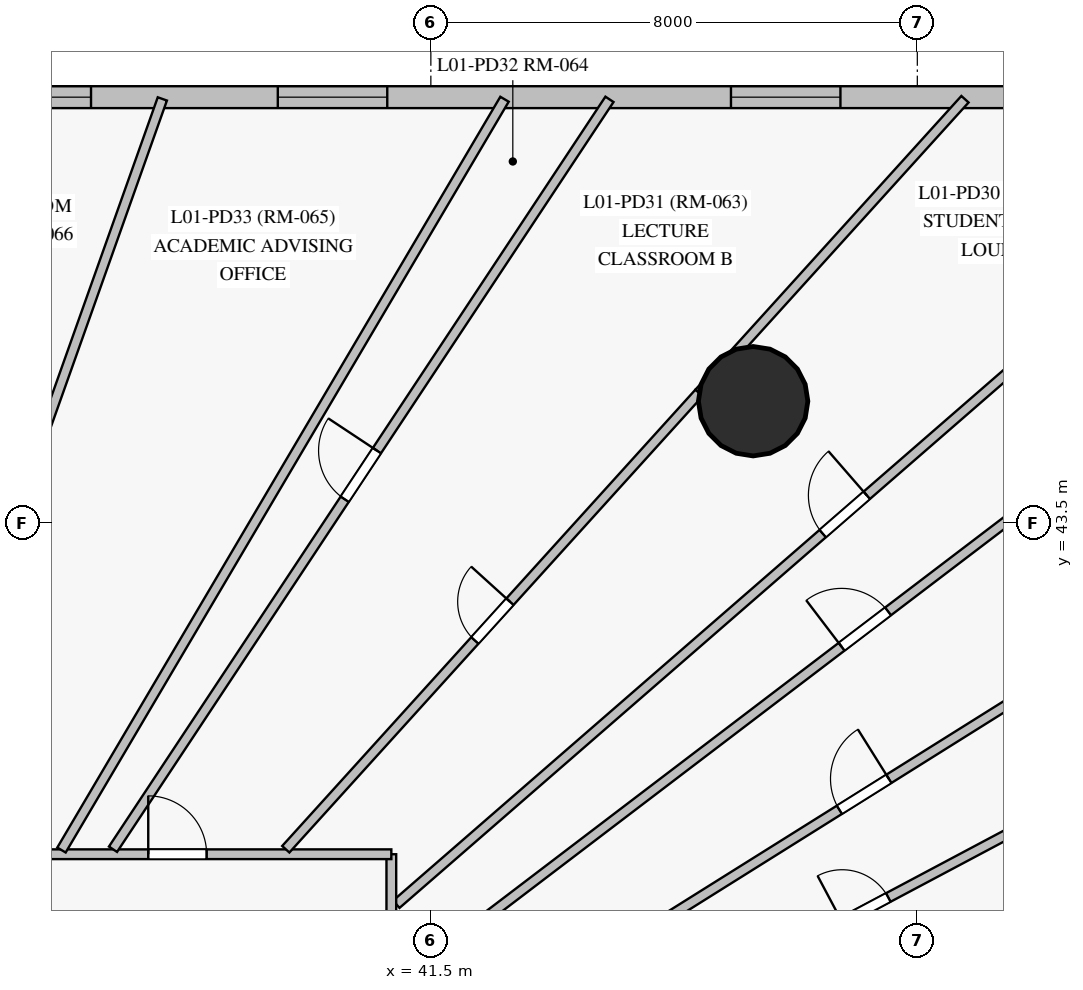
"""IFC4 building model, lengths in metres.
Left out: names, types, materials, properties, quantities, classifications, styles, units other than length and angle.
Written with IfcOpenShell. Run it as: python <this file> out.ifc"""

import sys

from ifc_helpers import new_model, si_unit, direction, frame, frame_2d, origin, origin_with_axes, origin_2d, place, context, subcontext, project, spatial, rectangle, circle, extrude, source, transform, mapped, element, fill, save


model = new_model("IFC4")
c1 = context("Model", 3, precision=1e-05, world=origin(), true_north=direction((0.0, 1.0)))
c2 = subcontext(c1, "Body", "Model", "MODEL_VIEW")
j1 = project(units=[si_unit("LENGTHUNIT", "METRE"), si_unit("PLANEANGLEUNIT", "RADIAN")], contexts=[c1])
p1 = place(None, origin())
s1 = spatial("IfcSite", under=j1, at=p1, CompositionType="ELEMENT")
p2 = place(p1, origin())
s2 = spatial("IfcBuilding", under=s1, at=p2, CompositionType="ELEMENT")
p3 = place(p2, frame((0.0, 0.0, 4.5)))
s3 = spatial("IfcBuildingStorey", under=s2, at=p3, CompositionType="ELEMENT", Elevation=4.5)
m1 = source(origin_with_axes(), c2, "Body", "SweptSolid", [
    extrude(circle(Radius=0.9, at=origin_2d()), origin(), (0.0, 0.0, 1.0), 4.5),
])
p4 = place(p3, frame((46.8, 45.5, 0.0), z_axis=(0.0, 0.0, 1.0), x_axis=(1.0, 0.0, 0.0)))
e1 = element("IfcColumn", 1, at=p4, inside=s3, PredefinedType="COLUMN", context=c2, shape_type="MappedRepresentation", body=[
    mapped(m1, transform((0.0, 0.0, 0.0), scale=1.0)),
])
p5 = place(p3, frame((55.3, 50.5, 0.0), z_axis=(0.0, 0.0, 1.0), x_axis=(-1.0, 0.0, 0.0)))
e2 = element("IfcWall", 2, at=p5, inside=s3, PredefinedType="SOLIDWALL", context=c2, shape_type="SweptSolid", body=[
    extrude(rectangle(XDim=51.85, YDim=0.36, at=frame_2d((25.925, 0.0))), origin(), (0.0, 0.0, 1.0), 4.2),
])
p6 = place(p5, frame((1.739, 0.0, 0.85)))
e3 = element("IfcOpeningElement", 3, at=p6, cuts=e2, PredefinedType="OPENING", context=c2, shape_type="SweptSolid", body=[
    extrude(rectangle(XDim=1.8, YDim=2.2, at=frame_2d((0.9, 1.1))), frame((0.0, 0.19, 0.0), z_axis=(0.0, -1.0, 0.0), x_axis=(1.0, 0.0, 0.0)), (0.0, 0.0, 1.0), 0.38),
])
p7 = place(p5, frame((7.064, 0.0, 0.85)))
e4 = element("IfcOpeningElement", 4, at=p7, cuts=e2, PredefinedType="OPENING", context=c2, shape_type="SweptSolid", body=[
    extrude(rectangle(XDim=1.8, YDim=2.2, at=frame_2d((0.9, 1.1))), frame((0.0, 0.19, 0.0), z_axis=(0.0, -1.0, 0.0), x_axis=(1.0, 0.0, 0.0)), (0.0, 0.0, 1.0), 0.38),
])
p8 = place(p5, frame((14.517, 0.0, 0.85)))
e5 = element("IfcOpeningElement", 5, at=p8, cuts=e2, PredefinedType="OPENING", context=c2, shape_type="SweptSolid", body=[
    extrude(rectangle(XDim=1.8, YDim=2.2, at=frame_2d((0.9, 1.1))), frame((0.0, 0.19, 0.0), z_axis=(0.0, -1.0, 0.0), x_axis=(1.0, 0.0, 0.0)), (0.0, 0.0, 1.0), 0.38),
])
p9 = place(p5, frame((19.389, 0.0, 0.85)))
e6 = element("IfcOpeningElement", 6, at=p9, cuts=e2, PredefinedType="OPENING", context=c2, shape_type="SweptSolid", body=[
    extrude(rectangle(XDim=1.8, YDim=2.2, at=frame_2d((0.9, 1.1))), frame((0.0, 0.19, 0.0), z_axis=(0.0, -1.0, 0.0), x_axis=(1.0, 0.0, 0.0)), (0.0, 0.0, 1.0), 0.38),
])
p10 = place(p5, frame((23.507, 0.0, 0.85)))
e7 = element("IfcOpeningElement", 7, at=p10, cuts=e2, PredefinedType="OPENING", context=c2, shape_type="SweptSolid", body=[
    extrude(rectangle(XDim=1.8, YDim=2.2, at=frame_2d((0.9, 1.1))), frame((0.0, 0.19, 0.0), z_axis=(0.0, -1.0, 0.0), x_axis=(1.0, 0.0, 0.0)), (0.0, 0.0, 1.0), 0.38),
])
p11 = place(p5, frame((27.282, 0.0, 0.85)))
e8 = element("IfcOpeningElement", 8, at=p11, cuts=e2, PredefinedType="OPENING", context=c2, shape_type="SweptSolid", body=[
    extrude(rectangle(XDim=1.8, YDim=2.2, at=frame_2d((0.9, 1.1))), frame((0.0, 0.19, 0.0), z_axis=(0.0, -1.0, 0.0), x_axis=(1.0, 0.0, 0.0)), (0.0, 0.0, 1.0), 0.38),
])
p12 = place(p5, frame((31.1, 0.0, 0.85)))
e9 = element("IfcOpeningElement", 9, at=p12, cuts=e2, PredefinedType="OPENING", context=c2, shape_type="SweptSolid", body=[
    extrude(rectangle(XDim=1.8, YDim=2.2, at=frame_2d((0.9, 1.1))), frame((0.0, 0.19, 0.0), z_axis=(0.0, -1.0, 0.0), x_axis=(1.0, 0.0, 0.0)), (0.0, 0.0, 1.0), 0.38),
])
p13 = place(p5, frame((35.392, 0.0, 0.85)))
e10 = element("IfcOpeningElement", 10, at=p13, cuts=e2, PredefinedType="OPENING", context=c2, shape_type="SweptSolid", body=[
    extrude(rectangle(XDim=1.8, YDim=2.2, at=frame_2d((0.9, 1.1))), frame((0.0, 0.19, 0.0), z_axis=(0.0, -1.0, 0.0), x_axis=(1.0, 0.0, 0.0)), (0.0, 0.0, 1.0), 0.38),
])
p14 = place(p5, frame((42.797, 0.0, 0.85)))
e11 = element("IfcOpeningElement", 11, at=p14, cuts=e2, PredefinedType="OPENING", context=c2, shape_type="SweptSolid", body=[
    extrude(rectangle(XDim=1.8, YDim=2.2, at=frame_2d((0.9, 1.1))), frame((0.0, 0.19, 0.0), z_axis=(0.0, -1.0, 0.0), x_axis=(1.0, 0.0, 0.0)), (0.0, 0.0, 1.0), 0.38),
])
p15 = place(p5, frame((47.865, 0.0, 0.85)))
e12 = element("IfcOpeningElement", 12, at=p15, cuts=e2, PredefinedType="OPENING", context=c2, shape_type="SweptSolid", body=[
    extrude(rectangle(XDim=1.8, YDim=2.2, at=frame_2d((0.9, 1.1))), frame((0.0, 0.19, 0.0), z_axis=(0.0, -1.0, 0.0), x_axis=(1.0, 0.0, 0.0)), (0.0, 0.0, 1.0), 0.38),
])
p16 = place(p3, frame((40.932, 37.227, 0.0), z_axis=(0.0, 0.0, 1.0), x_axis=(0.754711343855, 0.656057000158, 0.0)))
e13 = element("IfcWall", 13, at=p16, inside=s3, PredefinedType="PARTITIONING", context=c2, shape_type="SweptSolid", body=[
    extrude(rectangle(XDim=19.568, YDim=0.16, at=frame_2d((9.784, 0.0))), origin(), (0.0, 0.0, 1.0), 4.2),
])
p17 = place(p16, frame((9.291, 0.0, 0.0)))
e14 = element("IfcOpeningElement", 14, at=p17, cuts=e13, PredefinedType="OPENING", context=c2, shape_type="SweptSolid", body=[
    extrude(rectangle(XDim=0.96, YDim=2.15, at=frame_2d((0.48, 1.075))), frame((0.0, 0.09, 0.0), z_axis=(0.0, -1.0, 0.0), x_axis=(1.0, 0.0, 0.0)), (0.0, 0.0, 1.0), 0.18),
])
p18 = place(p3, frame((40.932, 35.888, 0.0), z_axis=(0.0, 0.0, 1.0), x_axis=(0.795705622, 0.605683550311, 0.0)))
e15 = element("IfcWall", 15, at=p18, inside=s3, PredefinedType="PARTITIONING", context=c2, shape_type="SweptSolid", body=[
    extrude(rectangle(XDim=19.392, YDim=0.16, at=frame_2d((9.696, 0.0))), origin(), (0.0, 0.0, 1.0), 4.2),
])
p19 = place(p18, frame((9.203, 0.0, 0.0)))
e16 = element("IfcOpeningElement", 16, at=p19, cuts=e15, PredefinedType="OPENING", context=c2, shape_type="SweptSolid", body=[
    extrude(rectangle(XDim=0.96, YDim=2.15, at=frame_2d((0.48, 1.075))), frame((0.0, 0.09, 0.0), z_axis=(0.0, -1.0, 0.0), x_axis=(1.0, 0.0, 0.0)), (0.0, 0.0, 1.0), 0.18),
])
p20 = place(p3, frame((40.85, 38.05, 0.0), z_axis=(0.0, 0.0, 1.0), x_axis=(0.0, -1.0, 0.0)))
e17 = element("IfcWall", 17, at=p20, inside=s3, PredefinedType="PARTITIONING", context=c2, shape_type="SweptSolid", body=[
    extrude(rectangle(XDim=18.508, YDim=0.16, at=frame_2d((9.254, 0.0))), origin(), (0.0, 0.0, 1.0), 3.25),
])
p21 = place(p20, frame((13.28, 0.0, 0.0)))
e18 = element("IfcOpeningElement", 18, at=p21, cuts=e17, PredefinedType="OPENING", context=c2, shape_type="SweptSolid", body=[
    extrude(rectangle(XDim=0.96, YDim=2.15, at=frame_2d((0.48, 1.075))), frame((0.0, 0.09, 0.0), z_axis=(0.0, -1.0, 0.0), x_axis=(1.0, 0.0, 0.0)), (0.0, 0.0, 1.0), 0.18),
])
p22 = place(p20, frame((11.636, 0.0, 0.0)))
e19 = element("IfcOpeningElement", 19, at=p22, cuts=e17, PredefinedType="OPENING", context=c2, shape_type="SweptSolid", body=[
    extrude(rectangle(XDim=0.96, YDim=2.15, at=frame_2d((0.48, 1.075))), frame((0.0, 0.09, 0.0), z_axis=(0.0, -1.0, 0.0), x_axis=(1.0, 0.0, 0.0)), (0.0, 0.0, 1.0), 0.18),
])
p23 = place(p20, frame((8.835, 0.0, 0.0)))
e20 = element("IfcOpeningElement", 20, at=p23, cuts=e17, PredefinedType="OPENING", context=c2, shape_type="SweptSolid", body=[
    extrude(rectangle(XDim=0.96, YDim=2.15, at=frame_2d((0.48, 1.075))), frame((0.0, 0.09, 0.0), z_axis=(0.0, -1.0, 0.0), x_axis=(1.0, 0.0, 0.0)), (0.0, 0.0, 1.0), 0.18),
])
p24 = place(p20, frame((6.084, 0.0, 0.0)))
e21 = element("IfcOpeningElement", 21, at=p24, cuts=e17, PredefinedType="OPENING", context=c2, shape_type="SweptSolid", body=[
    extrude(rectangle(XDim=0.96, YDim=2.15, at=frame_2d((0.48, 1.075))), frame((0.0, 0.09, 0.0), z_axis=(0.0, -1.0, 0.0), x_axis=(1.0, 0.0, 0.0)), (0.0, 0.0, 1.0), 0.18),
])
p25 = place(p20, frame((7.2, 0.0, 0.0)))
e22 = element("IfcOpeningElement", 22, at=p25, cuts=e17, PredefinedType="OPENING", context=c2, shape_type="SweptSolid", body=[
    extrude(rectangle(XDim=0.96, YDim=2.15, at=frame_2d((0.48, 1.075))), frame((0.0, 0.09, 0.0), z_axis=(0.0, -1.0, 0.0), x_axis=(1.0, 0.0, 0.0)), (0.0, 0.0, 1.0), 0.18),
])
p26 = place(p20, frame((2.446, 0.0, 0.0)))
e23 = element("IfcOpeningElement", 23, at=p26, cuts=e17, PredefinedType="OPENING", context=c2, shape_type="SweptSolid", body=[
    extrude(rectangle(XDim=0.86, YDim=2.04, at=frame_2d((0.43, 1.02))), frame((0.0, 0.09, 0.0), z_axis=(0.0, -1.0, 0.0), x_axis=(1.0, 0.0, 0.0)), (0.0, 0.0, 1.0), 0.18),
])
p27 = place(p20, frame((1.037, 0.0, 0.0)))
e24 = element("IfcOpeningElement", 24, at=p27, cuts=e17, PredefinedType="OPENING", context=c2, shape_type="SweptSolid", body=[
    extrude(rectangle(XDim=0.86, YDim=2.04, at=frame_2d((0.43, 1.02))), frame((0.0, 0.09, 0.0), z_axis=(0.0, -1.0, 0.0), x_axis=(1.0, 0.0, 0.0)), (0.0, 0.0, 1.0), 0.18),
])
p28 = place(p3, frame((40.919, 34.208, 0.0), z_axis=(0.0, 0.0, 1.0), x_axis=(0.847469594602, 0.530843937731, 0.0)))
e25 = element("IfcWall", 25, at=p28, inside=s3, PredefinedType="PARTITIONING", context=c2, shape_type="SweptSolid", body=[
    extrude(rectangle(XDim=18.226, YDim=0.16, at=frame_2d((9.113, 0.0))), origin(), (0.0, 0.0, 1.0), 4.2),
])
p29 = place(p28, frame((8.613, 0.0, 0.0)))
e26 = element("IfcOpeningElement", 26, at=p29, cuts=e25, PredefinedType="OPENING", context=c2, shape_type="SweptSolid", body=[
    extrude(rectangle(XDim=0.96, YDim=2.15, at=frame_2d((0.48, 1.075))), frame((0.0, 0.09, 0.0), z_axis=(0.0, -1.0, 0.0), x_axis=(1.0, 0.0, 0.0)), (0.0, 0.0, 1.0), 0.18),
])
p30 = place(p3, frame((40.919, 33.032, 0.0), z_axis=(0.0, 0.0, 1.0), x_axis=(0.883043074969, 0.469291942984, 0.0)))
e27 = element("IfcWall", 27, at=p30, inside=s3, PredefinedType="PARTITIONING", context=c2, shape_type="SweptSolid", body=[
    extrude(rectangle(XDim=17.495, YDim=0.16, at=frame_2d((8.748, 0.0))), origin(), (0.0, 0.0, 1.0), 4.2),
])
p31 = place(p30, frame((8.317, 0.0, 0.0)))
e28 = element("IfcOpeningElement", 28, at=p31, cuts=e27, PredefinedType="OPENING", context=c2, shape_type="SweptSolid", body=[
    extrude(rectangle(XDim=0.86, YDim=2.04, at=frame_2d((0.43, 1.02))), frame((0.0, 0.09, 0.0), z_axis=(0.0, -1.0, 0.0), x_axis=(1.0, 0.0, 0.0)), (0.0, 0.0, 1.0), 0.18),
])
p32 = place(p3, frame((40.918, 32.192, 0.0), z_axis=(0.0, 0.0, 1.0), x_axis=(0.907224152949, 0.420647520265, 0.0)))
e29 = element("IfcWall", 29, at=p32, inside=s3, PredefinedType="PARTITIONING", context=c2, shape_type="SweptSolid", body=[
    extrude(rectangle(XDim=17.031, YDim=0.16, at=frame_2d((8.515, 0.0))), origin(), (0.0, 0.0, 1.0), 4.2),
])
p33 = place(p32, frame((8.015, 0.0, 0.0)))
e30 = element("IfcOpeningElement", 30, at=p33, cuts=e29, PredefinedType="OPENING", context=c2, shape_type="SweptSolid", body=[
    extrude(rectangle(XDim=0.96, YDim=2.15, at=frame_2d((0.48, 1.075))), frame((0.0, 0.09, 0.0), z_axis=(0.0, -1.0, 0.0), x_axis=(1.0, 0.0, 0.0)), (0.0, 0.0, 1.0), 0.18),
])
p34 = place(p3, frame((25.4, 38.05, 0.0), z_axis=(0.0, 0.0, 1.0), x_axis=(1.0, 0.0, 0.0)))
e31 = element("IfcWall", 31, at=p34, inside=s3, PredefinedType="PARTITIONING", context=c2, shape_type="SweptSolid", body=[
    extrude(rectangle(XDim=15.45, YDim=0.16, at=frame_2d((7.725, 0.0))), origin(), (0.0, 0.0, 1.0), 4.2),
])
p35 = place(p34, frame((11.452, 0.0, 0.0)))
e32 = element("IfcOpeningElement", 32, at=p35, cuts=e31, PredefinedType="OPENING", context=c2, shape_type="SweptSolid", body=[
    extrude(rectangle(XDim=0.96, YDim=2.15, at=frame_2d((0.48, 1.075))), frame((0.0, 0.09, 0.0), z_axis=(0.0, -1.0, 0.0), x_axis=(1.0, 0.0, 0.0)), (0.0, 0.0, 1.0), 0.18),
])
p36 = place(p34, frame((7.59, 0.0, 0.0)))
e33 = element("IfcOpeningElement", 33, at=p36, cuts=e31, PredefinedType="OPENING", context=c2, shape_type="SweptSolid", body=[
    extrude(rectangle(XDim=0.96, YDim=2.15, at=frame_2d((0.48, 1.075))), frame((0.0, 0.09, 0.0), z_axis=(0.0, -1.0, 0.0), x_axis=(1.0, 0.0, 0.0)), (0.0, 0.0, 1.0), 0.18),
])
p37 = place(p34, frame((5.573, 0.0, 0.0)))
e34 = element("IfcOpeningElement", 34, at=p37, cuts=e31, PredefinedType="OPENING", context=c2, shape_type="SweptSolid", body=[
    extrude(rectangle(XDim=0.96, YDim=2.15, at=frame_2d((0.48, 1.075))), frame((0.0, 0.09, 0.0), z_axis=(0.0, -1.0, 0.0), x_axis=(1.0, 0.0, 0.0)), (0.0, 0.0, 1.0), 0.18),
])
p38 = place(p34, frame((3.528, 0.0, 0.0)))
e35 = element("IfcOpeningElement", 35, at=p38, cuts=e31, PredefinedType="OPENING", context=c2, shape_type="SweptSolid", body=[
    extrude(rectangle(XDim=0.96, YDim=2.15, at=frame_2d((0.48, 1.075))), frame((0.0, 0.09, 0.0), z_axis=(0.0, -1.0, 0.0), x_axis=(1.0, 0.0, 0.0)), (0.0, 0.0, 1.0), 0.18),
])
p39 = place(p3, frame((36.273, 38.132, 0.0), z_axis=(0.0, 0.0, 1.0), x_axis=(0.552038412562, 0.833818679963, 0.0)))
e36 = element("IfcWall", 36, at=p39, inside=s3, PredefinedType="PARTITIONING", context=c2, shape_type="SweptSolid", body=[
    extrude(rectangle(XDim=14.79, YDim=0.16, at=frame_2d((7.395, 0.0))), origin(), (0.0, 0.0, 1.0), 4.2),
])
p40 = place(p39, frame((6.903, 0.0, 0.0)))
e37 = element("IfcOpeningElement", 37, at=p40, cuts=e36, PredefinedType="OPENING", context=c2, shape_type="SweptSolid", body=[
    extrude(rectangle(XDim=0.96, YDim=2.15, at=frame_2d((0.48, 1.075))), frame((0.0, 0.09, 0.0), z_axis=(0.0, -1.0, 0.0), x_axis=(1.0, 0.0, 0.0)), (0.0, 0.0, 1.0), 0.18),
])
p41 = place(p3, frame((35.426, 38.119, 0.0), z_axis=(0.0, 0.0, 1.0), x_axis=(0.508185874547, 0.861247419103, 0.0)))
e38 = element("IfcWall", 38, at=p41, inside=s3, PredefinedType="PARTITIONING", context=c2, shape_type="SweptSolid", body=[
    extrude(rectangle(XDim=14.336, YDim=0.16, at=frame_2d((7.168, 0.0))), origin(), (0.0, 0.0, 1.0), 4.2),
])
p42 = place(p3, frame((32.698, 38.132, 0.0), z_axis=(0.0, 0.0, 1.0), x_axis=(0.33492470538, 0.942244894773, 0.0)))
e39 = element("IfcWall", 39, at=p42, inside=s3, PredefinedType="PARTITIONING", context=c2, shape_type="SweptSolid", body=[
    extrude(rectangle(XDim=13.095, YDim=0.16, at=frame_2d((6.548, 0.0))), origin(), (0.0, 0.0, 1.0), 4.2),
])
p43 = place(p3, frame((39.114, 38.132, 0.0), z_axis=(0.0, 0.0, 1.0), x_axis=(0.671237186901, 0.741242631613, 0.0)))
e40 = element("IfcWall", 40, at=p43, inside=s3, PredefinedType="PARTITIONING", context=c2, shape_type="SweptSolid", body=[
    extrude(rectangle(XDim=10.124, YDim=0.16, at=frame_2d((5.062, 0.0))), origin(), (0.0, 0.0, 1.0), 4.2),
])
p44 = place(p43, frame((4.632, 0.0, 0.0)))
e41 = element("IfcOpeningElement", 41, at=p44, cuts=e40, PredefinedType="OPENING", context=c2, shape_type="SweptSolid", body=[
    extrude(rectangle(XDim=0.86, YDim=2.04, at=frame_2d((0.43, 1.02))), frame((0.0, 0.09, 0.0), z_axis=(0.0, -1.0, 0.0), x_axis=(1.0, 0.0, 0.0)), (0.0, 0.0, 1.0), 0.18),
])
p45 = place(p3, frame((45.913, 45.64, 0.0), z_axis=(0.0, 0.0, 1.0), x_axis=(0.671236287412, 0.741243446151, 0.0)))
e42 = element("IfcWall", 42, at=p45, inside=s3, PredefinedType="PARTITIONING", context=c2, shape_type="SweptSolid", body=[
    extrude(rectangle(XDim=6.511, YDim=0.16, at=frame_2d((3.255, 0.0))), origin(), (0.0, 0.0, 1.0), 4.2),
])
m2 = source(origin_with_axes(), c2, "Body", "SweptSolid", [
    extrude(rectangle(XDim=1.8, YDim=2.2, at=frame_2d((0.9, 1.1))), frame((0.0, 0.03, 0.0), z_axis=(0.0, -1.0, 0.0), x_axis=(1.0, 0.0, 0.0)), (0.0, 0.0, 1.0), 0.06),
])
p46 = place(p7, origin())
e43 = element("IfcWindow", 43, at=p46, inside=s3, PartitioningType="SINGLE_PANEL", PredefinedType="WINDOW", context=c2, shape_type="MappedRepresentation", body=[
    mapped(m2, transform((0.0, 0.0, 0.0), scale=1.0)),
])
fill(e4, e43)
p47 = place(p8, origin())
e44 = element("IfcWindow", 44, at=p47, inside=s3, PartitioningType="SINGLE_PANEL", PredefinedType="WINDOW", context=c2, shape_type="MappedRepresentation", body=[
    mapped(m2, transform((0.0, 0.0, 0.0), scale=1.0)),
])
fill(e5, e44)
p48 = place(p9, origin())
e45 = element("IfcWindow", 45, at=p48, inside=s3, PartitioningType="SINGLE_PANEL", PredefinedType="WINDOW", context=c2, shape_type="MappedRepresentation", body=[
    mapped(m2, transform((0.0, 0.0, 0.0), scale=1.0)),
])
fill(e6, e45)
m3 = source(origin_with_axes(), c2, "Body", "SweptSolid", [
    extrude(rectangle(XDim=0.96, YDim=2.15, at=frame_2d((0.48, 1.075))), frame((0.0, 0.025, 0.0), z_axis=(0.0, -1.0, 0.0), x_axis=(1.0, 0.0, 0.0)), (0.0, 0.0, 1.0), 0.05),
])
p49 = place(p29, origin())
e46 = element("IfcDoor", 46, at=p49, inside=s3, OperationType="SINGLE_SWING_RIGHT", PredefinedType="DOOR", context=c2, shape_type="MappedRepresentation", body=[
    mapped(m3, transform((0.0, 0.0, 0.0), scale=1.0)),
])
fill(e26, e46)
p50 = place(p19, origin())
e47 = element("IfcDoor", 47, at=p50, inside=s3, OperationType="SINGLE_SWING_LEFT", PredefinedType="DOOR", context=c2, shape_type="MappedRepresentation", body=[
    mapped(m3, transform((0.0, 0.0, 0.0), scale=1.0)),
])
fill(e16, e47)
p51 = place(p17, origin())
e48 = element("IfcDoor", 48, at=p51, inside=s3, OperationType="SINGLE_SWING_RIGHT", PredefinedType="DOOR", context=c2, shape_type="MappedRepresentation", body=[
    mapped(m3, transform((0.0, 0.0, 0.0), scale=1.0)),
])
fill(e14, e48)
p52 = place(p35, origin())
e49 = element("IfcDoor", 49, at=p52, inside=s3, OperationType="SINGLE_SWING_LEFT", PredefinedType="DOOR", context=c2, shape_type="MappedRepresentation", body=[
    mapped(m3, transform((0.0, 0.0, 0.0), scale=1.0)),
])
fill(e32, e49)
p53 = place(p40, origin())
e50 = element("IfcDoor", 50, at=p53, inside=s3, OperationType="SINGLE_SWING_RIGHT", PredefinedType="DOOR", context=c2, shape_type="MappedRepresentation", body=[
    mapped(m3, transform((0.0, 0.0, 0.0), scale=1.0)),
])
fill(e37, e50)
m4 = source(origin_with_axes(), c2, "Body", "SweptSolid", [
    extrude(rectangle(XDim=0.86, YDim=2.04, at=frame_2d((0.43, 1.02))), frame((0.0, 0.025, 0.0), z_axis=(0.0, -1.0, 0.0), x_axis=(1.0, 0.0, 0.0)), (0.0, 0.0, 1.0), 0.05),
])
p54 = place(p31, origin())
e51 = element("IfcDoor", 51, at=p54, inside=s3, OperationType="SINGLE_SWING_LEFT", PredefinedType="DOOR", context=c2, shape_type="MappedRepresentation", body=[
    mapped(m4, transform((0.0, 0.0, 0.0), scale=1.0)),
])
fill(e28, e51)
p55 = place(p44, origin())
e52 = element("IfcDoor", 52, at=p55, inside=s3, OperationType="SINGLE_SWING_RIGHT", PredefinedType="DOOR", context=c2, shape_type="MappedRepresentation", body=[
    mapped(m4, transform((0.0, 0.0, 0.0), scale=1.0)),
])
fill(e41, e52)
save(model, sys.argv[1])
